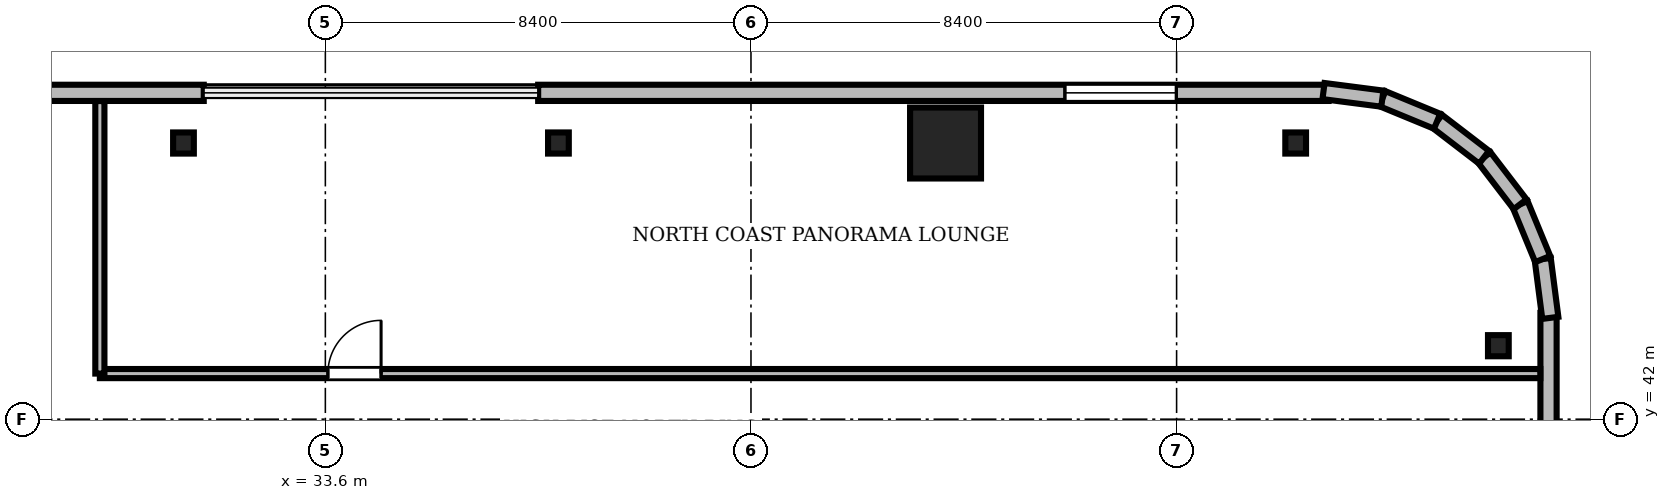
"""IFC4 building model, lengths in metres.
Left out: names, types, materials, properties, quantities, classifications, styles, units other than length and angle.
Written with IfcOpenShell. Run it as: python <this file> out.ifc"""

import sys

from ifc_helpers import new_model, si_unit, direction, frame, frame_2d, origin, origin_2d, place, context, subcontext, project, spatial, rectangle, i_section, extrude, source, transform, mapped, element, fill, save


model = new_model("IFC4")
c1 = context("Model", 3, precision=1e-05, world=origin(), true_north=direction((0.0, 1.0)))
c2 = subcontext(c1, "Body", "Model", "MODEL_VIEW")
j1 = project(units=[si_unit("LENGTHUNIT", "METRE"), si_unit("PLANEANGLEUNIT", "RADIAN")], contexts=[c1])
p1 = place(None, origin())
s1 = spatial("IfcSite", under=j1, at=p1, CompositionType="ELEMENT")
p2 = place(p1, origin())
s2 = spatial("IfcBuilding", under=s1, at=p2, CompositionType="ELEMENT")
p3 = place(p2, frame((0.0, 0.0, 199.8)))
s3 = spatial("IfcBuildingStorey", under=s2, at=p3, CompositionType="ELEMENT", Elevation=199.8)
m1 = source(origin(), c2, "Body", "SweptSolid", [
    extrude(rectangle(XDim=1.4, YDim=1.4, at=origin_2d()), origin(), (0.0, 0.0, 1.0), 3.53),
])
p4 = place(p3, frame((45.84, 47.45, 0.0), z_axis=(0.0, 0.0, 1.0), x_axis=(1.0, 0.0, 0.0)))
e1 = element("IfcColumn", 1, at=p4, inside=s3, PredefinedType="COLUMN", context=c2, shape_type="MappedRepresentation", body=[
    mapped(m1, transform((0.0, 0.0, 0.0), scale=1.0)),
])
m2 = source(origin(), c2, "Body", "SweptSolid", [
    extrude(i_section(OverallWidth=0.409, OverallDepth=0.417, WebThickness=0.021, FlangeThickness=0.033, FilletRadius=0.015, at=origin_2d()), origin(), (0.0, 0.0, 1.0), 3.53),
])
for number, where, z_axis, x_axis in (
    (2, (56.75, 43.45, 0.0), (0.0, 0.0, 1.0), (1.0, 0.0, 0.0)),
    (3, (52.75, 47.45, 0.0), (0.0, 0.0, 1.0), (1.0, 0.0, 0.0)),
    (4, (38.2, 47.45, 0.0), (0.0, 0.0, 1.0), (1.0, 0.0, 0.0)),
    (5, (30.8, 47.45, 0.0), (0.0, 0.0, 1.0), (1.0, 0.0, 0.0)),
):
    element("IfcColumn", number, at=place(p3, frame(where, z_axis=z_axis, x_axis=x_axis)), inside=s3, PredefinedType="COLUMN", context=c2, shape_type="MappedRepresentation", body=[
        mapped(m2, transform((0.0, 0.0, 0.0), scale=1.0)),
    ])
m3 = source(origin(), c2, "Body", "SweptSolid", [
    extrude(rectangle(XDim=15.6, YDim=0.32, at=frame_2d((7.8, 0.0))), origin(), (0.0, 0.0, 1.0), 3.53),
])
p5 = place(p3, frame((53.4, 48.44, 0.0), z_axis=(0.0, 0.0, 1.0), x_axis=(-1.0, 0.0, 0.0)))
e6 = element("IfcWall", 6, at=p5, inside=s3, PredefinedType="SOLIDWALL", context=c2, shape_type="MappedRepresentation", body=[
    mapped(m3, transform((0.0, 0.0, 0.0), scale=1.0)),
])
m4 = source(origin(), c2, "Body", "SweptSolid", [
    extrude(rectangle(XDim=2.2, YDim=2.4, at=frame_2d((1.1, 1.2))), frame((0.0, 0.17, 0.0), z_axis=(0.0, -1.0, 0.0), x_axis=(1.0, 0.0, 0.0)), (0.0, 0.0, 1.0), 0.34),
])
p6 = place(p5, frame((3.005, 0.0, 0.72)))
e7 = element("IfcOpeningElement", 7, at=p6, cuts=e6, PredefinedType="OPENING", context=c2, shape_type="MappedRepresentation", body=[
    mapped(m4, transform((0.0, 0.0, 0.0), scale=1.0)),
])
p7 = place(p3, frame((31.2, 48.44, 0.0), z_axis=(0.0, 0.0, 1.0), x_axis=(-1.0, 0.0, 0.0)))
e8 = element("IfcWall", 8, at=p7, inside=s3, PredefinedType="SOLIDWALL", context=c2, shape_type="MappedRepresentation", body=[
    mapped(m3, transform((0.0, 0.0, 0.0), scale=1.0)),
])
m5 = source(origin(), c2, "Body", "SweptSolid", [
    extrude(rectangle(XDim=1.4, YDim=2.3, at=frame_2d((0.7, 1.15))), frame((0.0, 0.17, 0.0), z_axis=(0.0, -1.0, 0.0), x_axis=(1.0, 0.0, 0.0)), (0.0, 0.0, 1.0), 0.34),
])
p8 = place(p7, frame((4.59, 0.0, 0.0)))
e9 = element("IfcOpeningElement", 9, at=p8, cuts=e8, PredefinedType="OPENING", context=c2, shape_type="MappedRepresentation", body=[
    mapped(m5, transform((0.0, 0.0, 0.0), scale=1.0)),
])
p9 = place(p7, frame((10.395, 0.0, 0.72)))
e10 = element("IfcOpeningElement", 10, at=p9, cuts=e8, PredefinedType="OPENING", context=c2, shape_type="MappedRepresentation", body=[
    mapped(m4, transform((0.0, 0.0, 0.0), scale=1.0)),
])
m6 = source(origin(), c2, "Body", "SweptSolid", [
    extrude(rectangle(XDim=15.6, YDim=0.32, at=frame_2d((7.8, 0.0))), origin(), (0.0, 0.0, 1.0), 3.53),
])
p10 = place(p3, frame((57.74, 28.5, 0.0), z_axis=(0.0, 0.0, 1.0), x_axis=(0.0, 1.0, 0.0)))
e11 = element("IfcWall", 11, at=p10, inside=s3, PredefinedType="SOLIDWALL", context=c2, shape_type="MappedRepresentation", body=[
    mapped(m6, transform((0.0, 0.0, 0.0), scale=1.0)),
])
p11 = place(p10, frame((10.395, 0.0, 0.72)))
e12 = element("IfcOpeningElement", 12, at=p11, cuts=e11, PredefinedType="OPENING", context=c2, shape_type="MappedRepresentation", body=[
    mapped(m4, transform((0.0, 0.0, 0.0), scale=1.0)),
])
m7 = source(origin(), c2, "Body", "SweptSolid", [
    extrude(rectangle(XDim=1.17, YDim=0.32, at=frame_2d((0.585, 0.0))), origin(), (0.0, 0.0, 1.0), 3.53),
])
p12 = place(p3, frame((57.776, 44.0, 0.0), z_axis=(0.0, 0.0, 1.0), x_axis=(-0.128295670475, 0.991735963317, 0.0)))
e13 = element("IfcWall", 13, at=p12, inside=s3, PredefinedType="SOLIDWALL", context=c2, shape_type="MappedRepresentation", body=[
    mapped(m7, transform((0.0, 0.0, 0.0), scale=1.0)),
])
m8 = source(origin(), c2, "Body", "SweptSolid", [
    extrude(rectangle(XDim=1.169, YDim=0.32, at=frame_2d((0.584, 0.0))), origin(), (0.0, 0.0, 1.0), 3.53),
])
p13 = place(p3, frame((57.625, 45.16, 0.0), z_axis=(0.0, 0.0, 1.0), x_axis=(-0.381054331552, 0.924552646638, 0.0)))
e14 = element("IfcWall", 14, at=p13, inside=s3, PredefinedType="SOLIDWALL", context=c2, shape_type="MappedRepresentation", body=[
    mapped(m8, transform((0.0, 0.0, 0.0), scale=1.0)),
])
m9 = source(origin(), c2, "Body", "SweptSolid", [
    extrude(rectangle(XDim=1.169, YDim=0.32, at=frame_2d((0.584, 0.0))), origin(), (0.0, 0.0, 1.0), 3.53),
])
p14 = place(p3, frame((57.18, 46.241, 0.0), z_axis=(0.0, 0.0, 1.0), x_axis=(-0.608387696831, 0.793639975269, 0.0)))
e15 = element("IfcWall", 15, at=p14, inside=s3, PredefinedType="SOLIDWALL", context=c2, shape_type="MappedRepresentation", body=[
    mapped(m9, transform((0.0, 0.0, 0.0), scale=1.0)),
])
m10 = source(origin(), c2, "Body", "SweptSolid", [
    extrude(rectangle(XDim=1.169, YDim=0.32, at=frame_2d((0.584, 0.0))), origin(), (0.0, 0.0, 1.0), 3.53),
])
p15 = place(p3, frame((56.469, 47.169, 0.0), z_axis=(0.0, 0.0, 1.0), x_axis=(-0.793663520347, 0.608356981114, 0.0)))
e16 = element("IfcWall", 16, at=p15, inside=s3, PredefinedType="SOLIDWALL", context=c2, shape_type="MappedRepresentation", body=[
    mapped(m10, transform((0.0, 0.0, 0.0), scale=1.0)),
])
p16 = place(p3, frame((55.541, 47.88, 0.0), z_axis=(0.0, 0.0, 1.0), x_axis=(-0.924552646638, 0.381054331552, 0.0)))
e17 = element("IfcWall", 17, at=p16, inside=s3, PredefinedType="SOLIDWALL", context=c2, shape_type="MappedRepresentation", body=[
    mapped(m8, transform((0.0, 0.0, 0.0), scale=1.0)),
])
p17 = place(p3, frame((54.46, 48.325, 0.0), z_axis=(0.0, 0.0, 1.0), x_axis=(-0.991735963317, 0.128295670475, 0.0)))
e18 = element("IfcWall", 18, at=p17, inside=s3, PredefinedType="SOLIDWALL", context=c2, shape_type="MappedRepresentation", body=[
    mapped(m7, transform((0.0, 0.0, 0.0), scale=1.0)),
])
m11 = source(origin(), c2, "Body", "SweptSolid", [
    extrude(rectangle(XDim=28.428, YDim=0.18, at=frame_2d((14.214, 0.0))), origin(), (0.0, 0.0, 1.0), 2.772),
])
p18 = place(p3, frame((29.15, 42.9, 0.0), z_axis=(0.0, 0.0, 1.0), x_axis=(1.0, 0.0, 0.0)))
e19 = element("IfcWall", 19, at=p18, inside=s3, PredefinedType="PARTITIONING", context=c2, shape_type="MappedRepresentation", body=[
    mapped(m11, transform((0.0, 0.0, 0.0), scale=1.0)),
])
m12 = source(origin(), c2, "Body", "SweptSolid", [
    extrude(rectangle(XDim=1.05, YDim=2.2, at=frame_2d((0.525, 1.1))), frame((0.0, 0.1, 0.0), z_axis=(0.0, -1.0, 0.0), x_axis=(1.0, 0.0, 0.0)), (0.0, 0.0, 1.0), 0.2),
])
p19 = place(p18, frame((4.5, 0.0, 0.0)))
e20 = element("IfcOpeningElement", 20, at=p19, cuts=e19, PredefinedType="OPENING", context=c2, shape_type="MappedRepresentation", body=[
    mapped(m12, transform((0.0, 0.0, 0.0), scale=1.0)),
])
m13 = source(origin(), c2, "Body", "SweptSolid", [
    extrude(rectangle(XDim=5.378, YDim=0.18, at=frame_2d((2.689, 0.0))), origin(), (0.0, 0.0, 1.0), 2.772),
])
p20 = place(p3, frame((29.15, 42.9, 0.0), z_axis=(0.0, 0.0, 1.0), x_axis=(0.0, 1.0, 0.0)))
e21 = element("IfcWall", 21, at=p20, inside=s3, PredefinedType="PARTITIONING", context=c2, shape_type="MappedRepresentation", body=[
    mapped(m13, transform((0.0, 0.0, 0.0), scale=1.0)),
])
m14 = source(origin(), c2, "Body", "SweptSolid", [
    extrude(rectangle(XDim=2.2, YDim=2.4, at=frame_2d((1.1, 1.2))), frame((0.0, 0.03, 0.0), z_axis=(0.0, -1.0, 0.0), x_axis=(1.0, 0.0, 0.0)), (0.0, 0.0, 1.0), 0.06),
])
p21 = place(p6, origin())
e22 = element("IfcWindow", 22, at=p21, inside=s3, PartitioningType="SINGLE_PANEL", PredefinedType="WINDOW", context=c2, shape_type="MappedRepresentation", body=[
    mapped(m14, transform((0.0, 0.0, 0.0), scale=1.0)),
])
fill(e7, e22)
m15 = source(origin(), c2, "Body", "SweptSolid", [
    extrude(rectangle(XDim=1.05, YDim=2.2, at=frame_2d((0.525, 1.1))), frame((0.0, 0.025, 0.0), z_axis=(0.0, -1.0, 0.0), x_axis=(1.0, 0.0, 0.0)), (0.0, 0.0, 1.0), 0.05),
])
p22 = place(p19, origin())
e23 = element("IfcDoor", 23, at=p22, inside=s3, OperationType="SINGLE_SWING_RIGHT", PredefinedType="DOOR", context=c2, shape_type="MappedRepresentation", body=[
    mapped(m15, transform((0.0, 0.0, 0.0), scale=1.0)),
])
fill(e20, e23)
save(model, sys.argv[1])
